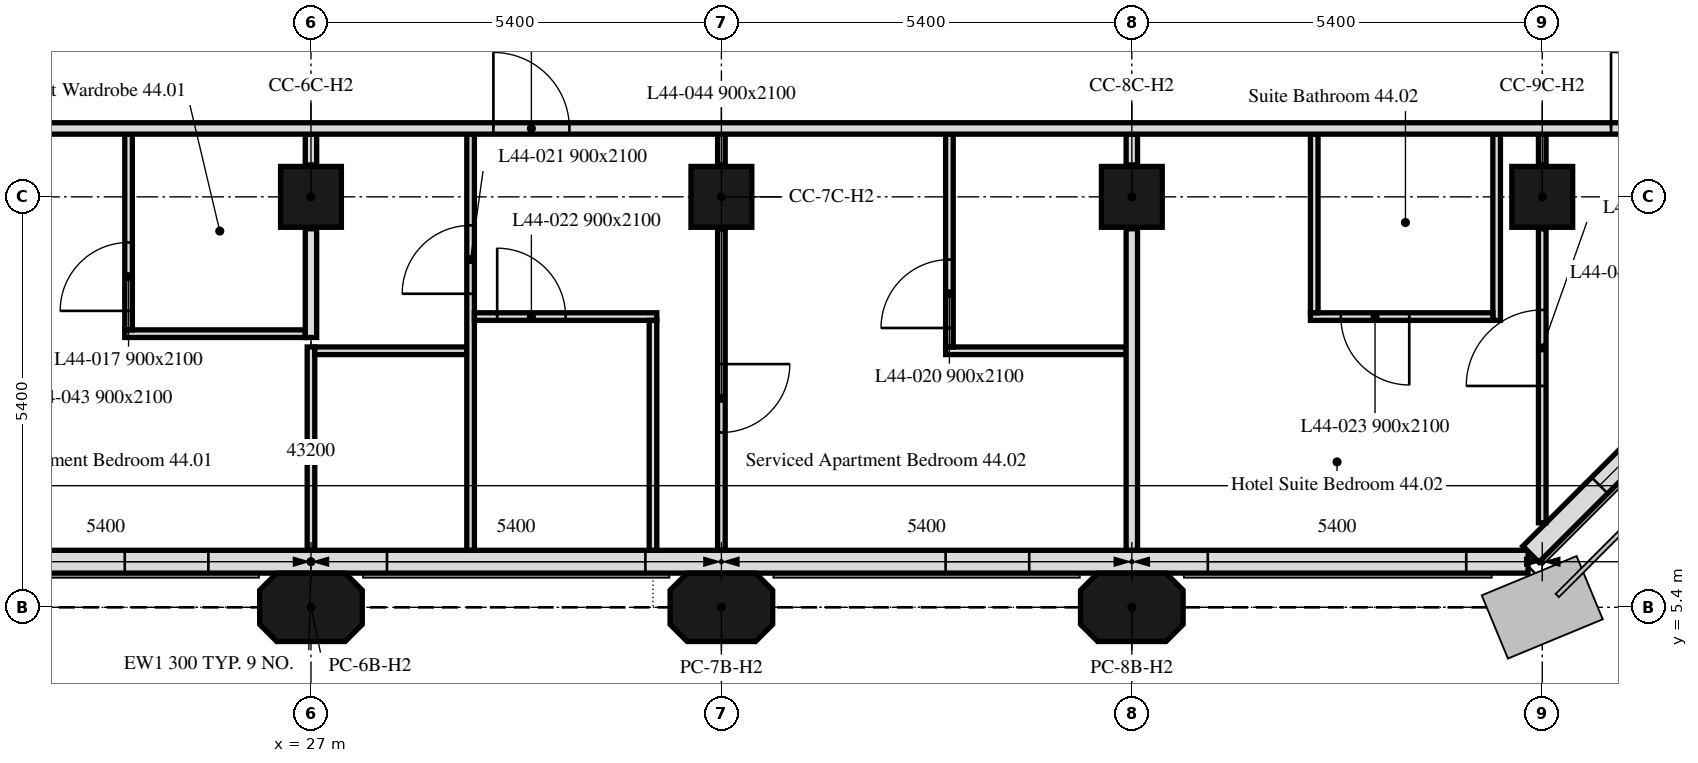
"""IFC4 building model, lengths in metres.
Left out: names, types, materials, properties, quantities, classifications, styles, units other than length and angle.
Written with IfcOpenShell. Run it as: python <this file> out.ifc"""

import sys

from ifc_helpers import new_model, si_unit, direction, frame, frame_2d, origin, origin_2d, place, context, subcontext, project, spatial, polyline, rectangle, outline, extrude, element, fill, save


model = new_model("IFC4")
c1 = context("Model", 3, precision=1e-05, world=origin(), true_north=direction((0.0, 1.0)))
c2 = subcontext(c1, "Body", "Model", "MODEL_VIEW")
j1 = project(units=[si_unit("LENGTHUNIT", "METRE"), si_unit("PLANEANGLEUNIT", "RADIAN")], contexts=[c1])
p1 = place(None, origin())
s1 = spatial("IfcSite", under=j1, at=p1, CompositionType="ELEMENT")
p2 = place(p1, origin())
s2 = spatial("IfcBuilding", under=s1, at=p2, CompositionType="ELEMENT")
p3 = place(p2, frame((0.0, 0.0, 184.0)))
s3 = spatial("IfcBuildingStorey", under=s2, at=p3, CompositionType="ELEMENT", Elevation=184.0)
for number, where, z_axis, x_axis in (
    (1, (27.0, 5.4, 0.0), (0.0, 0.0, 1.0), (1.0, 0.0, 0.0)),
    (2, (32.4, 5.4, 0.0), (0.0, 0.0, 1.0), (1.0, 0.0, 0.0)),
    (3, (37.8, 5.4, 0.0), (0.0, 0.0, 1.0), (1.0, 0.0, 0.0)),
):
    element("IfcColumn", number, at=place(p3, frame(where, z_axis=z_axis, x_axis=x_axis)), inside=s3, PredefinedType="COLUMN", context=c2, shape_type="SweptSolid", body=[
        extrude(outline(polyline([(-0.45, -0.45), (0.45, -0.45), (0.675, -0.225), (0.675, 0.225), (0.45, 0.45), (-0.45, 0.45), (-0.675, 0.225), (-0.675, -0.225), (-0.45, -0.45)])), origin(), (0.0, 0.0, 1.0), 3.0),
    ])
for number, where, z_axis, x_axis in (
    (4, (27.0, 10.8, 0.0), (0.0, 0.0, 1.0), (1.0, 0.0, 0.0)),
    (5, (32.4, 10.8, 0.0), (0.0, 0.0, 1.0), (1.0, 0.0, 0.0)),
    (6, (37.8, 10.8, 0.0), (0.0, 0.0, 1.0), (1.0, 0.0, 0.0)),
    (7, (43.2, 10.8, 0.0), (0.0, 0.0, 1.0), (1.0, 0.0, 0.0)),
):
    element("IfcColumn", number, at=place(p3, frame(where, z_axis=z_axis, x_axis=x_axis)), inside=s3, PredefinedType="COLUMN", context=c2, shape_type="SweptSolid", body=[
        extrude(rectangle(XDim=0.8, YDim=0.8, at=origin_2d()), origin(), (0.0, 0.0, 1.0), 3.0),
    ])
p4 = place(p3, frame((10.986, 6.0, 0.0), z_axis=(0.0, 0.0, 1.0), x_axis=(1.0, 0.0, 0.0)))
e8 = element("IfcWall", 8, at=p4, inside=s3, PredefinedType="SOLIDWALL", context=c2, shape_type="SweptSolid", body=[
    extrude(rectangle(XDim=32.027, YDim=0.3, at=frame_2d((16.014, 0.0))), origin(), (0.0, 0.0, 1.0), 3.0),
])
p5 = place(p4, frame((2.764, 0.0, 0.9)))
e9 = element("IfcOpeningElement", 9, at=p5, cuts=e8, PredefinedType="OPENING", context=c2, shape_type="SweptSolid", body=[
    extrude(rectangle(XDim=1.1, YDim=1.7, at=frame_2d((0.55, 0.85))), frame((0.0, 0.16, 0.0), z_axis=(0.0, -1.0, 0.0), x_axis=(1.0, 0.0, 0.0)), (0.0, 0.0, 1.0), 0.32),
])
p6 = place(p4, frame((6.214, 0.0, 0.9)))
e10 = element("IfcOpeningElement", 10, at=p6, cuts=e8, PredefinedType="OPENING", context=c2, shape_type="SweptSolid", body=[
    extrude(rectangle(XDim=3.4, YDim=1.7, at=frame_2d((1.7, 0.85))), frame((0.0, 0.16, 0.0), z_axis=(0.0, -1.0, 0.0), x_axis=(1.0, 0.0, 0.0)), (0.0, 0.0, 1.0), 0.32),
])
p7 = place(p4, frame((13.564, 0.0, 0.9)))
e11 = element("IfcOpeningElement", 11, at=p7, cuts=e8, PredefinedType="OPENING", context=c2, shape_type="SweptSolid", body=[
    extrude(rectangle(XDim=1.1, YDim=1.7, at=frame_2d((0.55, 0.85))), frame((0.0, 0.16, 0.0), z_axis=(0.0, -1.0, 0.0), x_axis=(1.0, 0.0, 0.0)), (0.0, 0.0, 1.0), 0.32),
])
p8 = place(p4, frame((17.014, 0.0, 0.9)))
e12 = element("IfcOpeningElement", 12, at=p8, cuts=e8, PredefinedType="OPENING", context=c2, shape_type="SweptSolid", body=[
    extrude(rectangle(XDim=3.4, YDim=1.7, at=frame_2d((1.7, 0.85))), frame((0.0, 0.16, 0.0), z_axis=(0.0, -1.0, 0.0), x_axis=(1.0, 0.0, 0.0)), (0.0, 0.0, 1.0), 0.32),
])
p9 = place(p4, frame((24.364, 0.0, 0.9)))
e13 = element("IfcOpeningElement", 13, at=p9, cuts=e8, PredefinedType="OPENING", context=c2, shape_type="SweptSolid", body=[
    extrude(rectangle(XDim=1.1, YDim=1.7, at=frame_2d((0.55, 0.85))), frame((0.0, 0.16, 0.0), z_axis=(0.0, -1.0, 0.0), x_axis=(1.0, 0.0, 0.0)), (0.0, 0.0, 1.0), 0.32),
])
p10 = place(p4, frame((27.814, 0.0, 0.9)))
e14 = element("IfcOpeningElement", 14, at=p10, cuts=e8, PredefinedType="OPENING", context=c2, shape_type="SweptSolid", body=[
    extrude(rectangle(XDim=3.4, YDim=1.7, at=frame_2d((1.7, 0.85))), frame((0.0, 0.16, 0.0), z_axis=(0.0, -1.0, 0.0), x_axis=(1.0, 0.0, 0.0)), (0.0, 0.0, 1.0), 0.32),
])
p11 = place(p3, frame((43.051, 6.099, 0.0), z_axis=(0.0, 0.0, 1.0), x_axis=(0.707106781187, 0.707106781187, 0.0)))
e15 = element("IfcWall", 15, at=p11, inside=s3, PredefinedType="SOLIDWALL", context=c2, shape_type="SweptSolid", body=[
    extrude(rectangle(XDim=6.86, YDim=0.3, at=frame_2d((3.43, 0.0))), origin(), (0.0, 0.0, 1.0), 3.0),
])
p12 = place(p11, frame((1.28, 0.0, 0.9)))
e16 = element("IfcOpeningElement", 16, at=p12, cuts=e15, PredefinedType="OPENING", context=c2, shape_type="SweptSolid", body=[
    extrude(rectangle(XDim=1.1, YDim=1.7, at=frame_2d((0.55, 0.85))), frame((0.0, 0.16, 0.0), z_axis=(0.0, -1.0, 0.0), x_axis=(1.0, 0.0, 0.0)), (0.0, 0.0, 1.0), 0.32),
])
p13 = place(p11, frame((4.48, 0.0, 0.9)))
e17 = element("IfcOpeningElement", 17, at=p13, cuts=e15, PredefinedType="OPENING", context=c2, shape_type="SweptSolid", body=[
    extrude(rectangle(XDim=1.1, YDim=1.7, at=frame_2d((0.55, 0.85))), frame((0.0, 0.16, 0.0), z_axis=(0.0, -1.0, 0.0), x_axis=(1.0, 0.0, 0.0)), (0.0, 0.0, 1.0), 0.32),
])
p14 = place(p3, frame((27.0, 6.151, 0.0), z_axis=(0.0, 0.0, 1.0), x_axis=(0.0, 1.0, 0.0)))
e18 = element("IfcWall", 18, at=p14, inside=s3, PredefinedType="PARTITIONING", context=c2, shape_type="SweptSolid", body=[
    extrude(rectangle(XDim=2.674, YDim=0.1, at=frame_2d((1.337, 0.0))), origin(), (0.0, 0.0, 1.0), 3.0),
])
p15 = place(p3, frame((26.925, 9.0, 0.0), z_axis=(0.0, 0.0, 1.0), x_axis=(-1.0, 0.0, 0.0)))
e19 = element("IfcWall", 19, at=p15, inside=s3, PredefinedType="PARTITIONING", context=c2, shape_type="SweptSolid", body=[
    extrude(rectangle(XDim=2.375, YDim=0.1, at=frame_2d((1.188, 0.0))), origin(), (0.0, 0.0, 1.0), 3.0),
])
p16 = place(p3, frame((24.6, 9.05, 0.0), z_axis=(0.0, 0.0, 1.0), x_axis=(0.0, 1.0, 0.0)))
e20 = element("IfcWall", 20, at=p16, inside=s3, PredefinedType="PARTITIONING", context=c2, shape_type="SweptSolid", body=[
    extrude(rectangle(XDim=2.575, YDim=0.1, at=frame_2d((1.288, 0.0))), origin(), (0.0, 0.0, 1.0), 3.0),
])
p17 = place(p16, frame((0.25, 0.0, 0.0)))
e21 = element("IfcOpeningElement", 21, at=p17, cuts=e20, PredefinedType="OPENING", context=c2, shape_type="SweptSolid", body=[
    extrude(rectangle(XDim=0.9, YDim=2.1, at=frame_2d((0.45, 1.05))), frame((0.0, 0.05, 0.0), z_axis=(0.0, -1.0, 0.0), x_axis=(1.0, 0.0, 0.0)), (0.0, 0.0, 1.0), 0.1),
])
p18 = place(p3, frame((27.0, 8.95, 0.0), z_axis=(0.0, 0.0, 1.0), x_axis=(0.0, 1.0, 0.0)))
e22 = element("IfcWall", 22, at=p18, inside=s3, PredefinedType="PARTITIONING", context=c2, shape_type="SweptSolid", body=[
    extrude(rectangle(XDim=1.43, YDim=0.15, at=frame_2d((0.715, 0.0))), origin(), (0.0, 0.0, 1.0), 3.0),
])
p19 = place(p3, frame((27.0, 11.22, 0.0), z_axis=(0.0, 0.0, 1.0), x_axis=(0.0, 1.0, 0.0)))
e23 = element("IfcWall", 23, at=p19, inside=s3, PredefinedType="PARTITIONING", context=c2, shape_type="SweptSolid", body=[
    extrude(rectangle(XDim=0.405, YDim=0.15, at=frame_2d((0.203, 0.0))), origin(), (0.0, 0.0, 1.0), 3.0),
])
p20 = place(p3, frame((37.725, 8.775, 0.0), z_axis=(0.0, 0.0, 1.0), x_axis=(-1.0, 0.0, 0.0)))
e24 = element("IfcWall", 24, at=p20, inside=s3, PredefinedType="PARTITIONING", context=c2, shape_type="SweptSolid", body=[
    extrude(rectangle(XDim=2.375, YDim=0.1, at=frame_2d((1.188, 0.0))), origin(), (0.0, 0.0, 1.0), 3.0),
])
p21 = place(p3, frame((35.4, 8.825, 0.0), z_axis=(0.0, 0.0, 1.0), x_axis=(0.0, 1.0, 0.0)))
e25 = element("IfcWall", 25, at=p21, inside=s3, PredefinedType="PARTITIONING", context=c2, shape_type="SweptSolid", body=[
    extrude(rectangle(XDim=2.8, YDim=0.1, at=frame_2d((1.4, 0.0))), origin(), (0.0, 0.0, 1.0), 3.0),
])
p22 = place(p21, frame((0.25, 0.0, 0.0)))
e26 = element("IfcOpeningElement", 26, at=p22, cuts=e25, PredefinedType="OPENING", context=c2, shape_type="SweptSolid", body=[
    extrude(rectangle(XDim=0.9, YDim=2.1, at=frame_2d((0.45, 1.05))), frame((0.0, 0.05, 0.0), z_axis=(0.0, -1.0, 0.0), x_axis=(1.0, 0.0, 0.0)), (0.0, 0.0, 1.0), 0.1),
])
p23 = place(p3, frame((32.4, 11.625, 0.0), z_axis=(0.0, 0.0, 1.0), x_axis=(0.0, -1.0, 0.0)))
e27 = element("IfcWall", 27, at=p23, inside=s3, PredefinedType="PARTITIONING", context=c2, shape_type="SweptSolid", body=[
    extrude(rectangle(XDim=0.405, YDim=0.1, at=frame_2d((0.203, 0.0))), origin(), (0.0, 0.0, 1.0), 3.0),
])
p24 = place(p3, frame((32.4, 10.38, 0.0), z_axis=(0.0, 0.0, 1.0), x_axis=(0.0, -1.0, 0.0)))
e28 = element("IfcWall", 28, at=p24, inside=s3, PredefinedType="PARTITIONING", context=c2, shape_type="SweptSolid", body=[
    extrude(rectangle(XDim=4.229, YDim=0.1, at=frame_2d((2.115, 0.0))), origin(), (0.0, 0.0, 1.0), 3.0),
])
p25 = place(p24, frame((1.78, 0.0, 0.0)))
e29 = element("IfcOpeningElement", 29, at=p25, cuts=e28, PredefinedType="OPENING", context=c2, shape_type="SweptSolid", body=[
    extrude(rectangle(XDim=0.9, YDim=2.1, at=frame_2d((0.45, 1.05))), frame((0.0, 0.05, 0.0), z_axis=(0.0, -1.0, 0.0), x_axis=(1.0, 0.0, 0.0)), (0.0, 0.0, 1.0), 0.1),
])
p26 = place(p3, frame((27.05, 8.775, 0.0), z_axis=(0.0, 0.0, 1.0), x_axis=(1.0, 0.0, 0.0)))
e30 = element("IfcWall", 30, at=p26, inside=s3, PredefinedType="PARTITIONING", context=c2, shape_type="SweptSolid", body=[
    extrude(rectangle(XDim=2.0, YDim=0.1, at=frame_2d((1.0, 0.0))), origin(), (0.0, 0.0, 1.0), 3.0),
])
p27 = place(p3, frame((29.1, 6.151, 0.0), z_axis=(0.0, 0.0, 1.0), x_axis=(0.0, 1.0, 0.0)))
e31 = element("IfcWall", 31, at=p27, inside=s3, PredefinedType="PARTITIONING", context=c2, shape_type="SweptSolid", body=[
    extrude(rectangle(XDim=5.474, YDim=0.1, at=frame_2d((2.737, 0.0))), origin(), (0.0, 0.0, 1.0), 3.0),
])
p28 = place(p27, frame((3.374, 0.0, 0.0)))
e32 = element("IfcOpeningElement", 32, at=p28, cuts=e31, PredefinedType="OPENING", context=c2, shape_type="SweptSolid", body=[
    extrude(rectangle(XDim=0.9, YDim=2.1, at=frame_2d((0.45, 1.05))), frame((0.0, 0.05, 0.0), z_axis=(0.0, -1.0, 0.0), x_axis=(1.0, 0.0, 0.0)), (0.0, 0.0, 1.0), 0.1),
])
p29 = place(p3, frame((29.15, 9.225, 0.0), z_axis=(0.0, 0.0, 1.0), x_axis=(1.0, 0.0, 0.0)))
e33 = element("IfcWall", 33, at=p29, inside=s3, PredefinedType="PARTITIONING", context=c2, shape_type="SweptSolid", body=[
    extrude(rectangle(XDim=2.4, YDim=0.1, at=frame_2d((1.2, 0.0))), origin(), (0.0, 0.0, 1.0), 3.0),
])
p30 = place(p29, frame((0.3, 0.0, 0.0)))
e34 = element("IfcOpeningElement", 34, at=p30, cuts=e33, PredefinedType="OPENING", context=c2, shape_type="SweptSolid", body=[
    extrude(rectangle(XDim=0.9, YDim=2.1, at=frame_2d((0.45, 1.05))), frame((0.0, 0.05, 0.0), z_axis=(0.0, -1.0, 0.0), x_axis=(1.0, 0.0, 0.0)), (0.0, 0.0, 1.0), 0.1),
])
p31 = place(p3, frame((31.5, 9.175, 0.0), z_axis=(0.0, 0.0, 1.0), x_axis=(0.0, -1.0, 0.0)))
e35 = element("IfcWall", 35, at=p31, inside=s3, PredefinedType="PARTITIONING", context=c2, shape_type="SweptSolid", body=[
    extrude(rectangle(XDim=3.024, YDim=0.1, at=frame_2d((1.512, 0.0))), origin(), (0.0, 0.0, 1.0), 3.0),
])
p32 = place(p3, frame((37.8, 6.151, 0.0), z_axis=(0.0, 0.0, 1.0), x_axis=(0.0, 1.0, 0.0)))
e36 = element("IfcWall", 36, at=p32, inside=s3, PredefinedType="PARTITIONING", context=c2, shape_type="SweptSolid", body=[
    extrude(rectangle(XDim=4.229, YDim=0.15, at=frame_2d((2.115, 0.0))), origin(), (0.0, 0.0, 1.0), 3.0),
])
p33 = place(p3, frame((37.8, 11.22, 0.0), z_axis=(0.0, 0.0, 1.0), x_axis=(0.0, 1.0, 0.0)))
e37 = element("IfcWall", 37, at=p33, inside=s3, PredefinedType="PARTITIONING", context=c2, shape_type="SweptSolid", body=[
    extrude(rectangle(XDim=0.405, YDim=0.15, at=frame_2d((0.203, 0.0))), origin(), (0.0, 0.0, 1.0), 3.0),
])
p34 = place(p3, frame((43.2, 6.512, 0.0), z_axis=(0.0, 0.0, 1.0), x_axis=(0.0, 1.0, 0.0)))
e38 = element("IfcWall", 38, at=p34, inside=s3, PredefinedType="PARTITIONING", context=c2, shape_type="SweptSolid", body=[
    extrude(rectangle(XDim=3.868, YDim=0.1, at=frame_2d((1.934, 0.0))), origin(), (0.0, 0.0, 1.0), 3.0),
])
p35 = place(p34, frame((1.8, 0.0, 0.0)))
e39 = element("IfcOpeningElement", 39, at=p35, cuts=e38, PredefinedType="OPENING", context=c2, shape_type="SweptSolid", body=[
    extrude(rectangle(XDim=1.0, YDim=2.1, at=frame_2d((0.5, 1.05))), frame((0.0, 0.05, 0.0), z_axis=(0.0, -1.0, 0.0), x_axis=(1.0, 0.0, 0.0)), (0.0, 0.0, 1.0), 0.1),
])
p36 = place(p3, frame((43.2, 11.22, 0.0), z_axis=(0.0, 0.0, 1.0), x_axis=(0.0, 1.0, 0.0)))
e40 = element("IfcWall", 40, at=p36, inside=s3, PredefinedType="PARTITIONING", context=c2, shape_type="SweptSolid", body=[
    extrude(rectangle(XDim=0.405, YDim=0.1, at=frame_2d((0.203, 0.0))), origin(), (0.0, 0.0, 1.0), 3.0),
])
p37 = place(p3, frame((42.6, 11.625, 0.0), z_axis=(0.0, 0.0, 1.0), x_axis=(0.0, -1.0, 0.0)))
e41 = element("IfcWall", 41, at=p37, inside=s3, PredefinedType="PARTITIONING", context=c2, shape_type="SweptSolid", body=[
    extrude(rectangle(XDim=2.45, YDim=0.1, at=frame_2d((1.225, 0.0))), origin(), (0.0, 0.0, 1.0), 3.0),
])
p38 = place(p3, frame((42.55, 9.225, 0.0), z_axis=(0.0, 0.0, 1.0), x_axis=(-1.0, 0.0, 0.0)))
e42 = element("IfcWall", 42, at=p38, inside=s3, PredefinedType="PARTITIONING", context=c2, shape_type="SweptSolid", body=[
    extrude(rectangle(XDim=2.4, YDim=0.1, at=frame_2d((1.2, 0.0))), origin(), (0.0, 0.0, 1.0), 3.0),
])
p39 = place(p38, frame((1.1, 0.0, 0.0)))
e43 = element("IfcOpeningElement", 43, at=p39, cuts=e42, PredefinedType="OPENING", context=c2, shape_type="SweptSolid", body=[
    extrude(rectangle(XDim=0.9, YDim=2.1, at=frame_2d((0.45, 1.05))), frame((0.0, 0.05, 0.0), z_axis=(0.0, -1.0, 0.0), x_axis=(1.0, 0.0, 0.0)), (0.0, 0.0, 1.0), 0.1),
])
p40 = place(p3, frame((40.2, 9.275, 0.0), z_axis=(0.0, 0.0, 1.0), x_axis=(0.0, 1.0, 0.0)))
e44 = element("IfcWall", 44, at=p40, inside=s3, PredefinedType="PARTITIONING", context=c2, shape_type="SweptSolid", body=[
    extrude(rectangle(XDim=2.35, YDim=0.1, at=frame_2d((1.175, 0.0))), origin(), (0.0, 0.0, 1.0), 3.0),
])
p41 = place(p3, frame((6.151, 11.7, 0.0), z_axis=(0.0, 0.0, 1.0), x_axis=(1.0, 0.0, 0.0)))
e45 = element("IfcWall", 45, at=p41, inside=s3, PredefinedType="PARTITIONING", context=c2, shape_type="SweptSolid", body=[
    extrude(rectangle(XDim=41.698, YDim=0.15, at=frame_2d((20.849, 0.0))), origin(), (0.0, 0.0, 1.0), 3.0),
])
p42 = place(p41, frame((1.449, 0.0, 0.0)))
e46 = element("IfcOpeningElement", 46, at=p42, cuts=e45, PredefinedType="OPENING", context=c2, shape_type="SweptSolid", body=[
    extrude(rectangle(XDim=1.0, YDim=2.1, at=frame_2d((0.5, 1.05))), frame((0.0, 0.075, 0.0), z_axis=(0.0, -1.0, 0.0), x_axis=(1.0, 0.0, 0.0)), (0.0, 0.0, 1.0), 0.15),
])
p43 = place(p41, frame((37.954, 0.0, 0.0)))
e47 = element("IfcOpeningElement", 47, at=p43, cuts=e45, PredefinedType="OPENING", context=c2, shape_type="SweptSolid", body=[
    extrude(rectangle(XDim=1.0, YDim=2.1, at=frame_2d((0.5, 1.05))), frame((0.0, 0.075, 0.0), z_axis=(0.0, -1.0, 0.0), x_axis=(1.0, 0.0, 0.0)), (0.0, 0.0, 1.0), 0.15),
])
p44 = place(p41, frame((12.449, 0.0, 0.0)))
e48 = element("IfcOpeningElement", 48, at=p44, cuts=e45, PredefinedType="OPENING", context=c2, shape_type="SweptSolid", body=[
    extrude(rectangle(XDim=1.0, YDim=2.1, at=frame_2d((0.5, 1.05))), frame((0.0, 0.075, 0.0), z_axis=(0.0, -1.0, 0.0), x_axis=(1.0, 0.0, 0.0)), (0.0, 0.0, 1.0), 0.15),
])
p45 = place(p41, frame((23.249, 0.0, 0.0)))
e49 = element("IfcOpeningElement", 49, at=p45, cuts=e45, PredefinedType="OPENING", context=c2, shape_type="SweptSolid", body=[
    extrude(rectangle(XDim=1.0, YDim=2.1, at=frame_2d((0.5, 1.05))), frame((0.0, 0.075, 0.0), z_axis=(0.0, -1.0, 0.0), x_axis=(1.0, 0.0, 0.0)), (0.0, 0.0, 1.0), 0.15),
])
p46 = place(p7, origin())
e50 = element("IfcWindow", 50, at=p46, inside=s3, PartitioningType="SINGLE_PANEL", PredefinedType="WINDOW", context=c2, shape_type="SweptSolid", body=[
    extrude(rectangle(XDim=1.1, YDim=1.7, at=frame_2d((0.55, 0.85))), frame((0.0, 0.03, 0.0), z_axis=(0.0, -1.0, 0.0), x_axis=(1.0, 0.0, 0.0)), (0.0, 0.0, 1.0), 0.06),
])
fill(e11, e50)
p47 = place(p8, origin())
e51 = element("IfcWindow", 51, at=p47, inside=s3, PartitioningType="SINGLE_PANEL", PredefinedType="WINDOW", context=c2, shape_type="SweptSolid", body=[
    extrude(rectangle(XDim=3.4, YDim=1.7, at=frame_2d((1.7, 0.85))), frame((0.0, 0.03, 0.0), z_axis=(0.0, -1.0, 0.0), x_axis=(1.0, 0.0, 0.0)), (0.0, 0.0, 1.0), 0.06),
])
fill(e12, e51)
p48 = place(p9, origin())
e52 = element("IfcWindow", 52, at=p48, inside=s3, PartitioningType="SINGLE_PANEL", PredefinedType="WINDOW", context=c2, shape_type="SweptSolid", body=[
    extrude(rectangle(XDim=1.1, YDim=1.7, at=frame_2d((0.55, 0.85))), frame((0.0, 0.03, 0.0), z_axis=(0.0, -1.0, 0.0), x_axis=(1.0, 0.0, 0.0)), (0.0, 0.0, 1.0), 0.06),
])
fill(e13, e52)
p49 = place(p10, origin())
e53 = element("IfcWindow", 53, at=p49, inside=s3, PartitioningType="SINGLE_PANEL", PredefinedType="WINDOW", context=c2, shape_type="SweptSolid", body=[
    extrude(rectangle(XDim=3.4, YDim=1.7, at=frame_2d((1.7, 0.85))), frame((0.0, 0.03, 0.0), z_axis=(0.0, -1.0, 0.0), x_axis=(1.0, 0.0, 0.0)), (0.0, 0.0, 1.0), 0.06),
])
fill(e14, e53)
p50 = place(p12, origin())
e54 = element("IfcWindow", 54, at=p50, inside=s3, PartitioningType="SINGLE_PANEL", PredefinedType="WINDOW", context=c2, shape_type="SweptSolid", body=[
    extrude(rectangle(XDim=1.1, YDim=1.7, at=frame_2d((0.55, 0.85))), frame((0.0, 0.03, 0.0), z_axis=(0.0, -1.0, 0.0), x_axis=(1.0, 0.0, 0.0)), (0.0, 0.0, 1.0), 0.06),
])
fill(e16, e54)
p51 = place(p17, origin())
e55 = element("IfcDoor", 55, at=p51, inside=s3, OperationType="SINGLE_SWING_RIGHT", PredefinedType="DOOR", context=c2, shape_type="SweptSolid", body=[
    extrude(rectangle(XDim=0.9, YDim=2.1, at=frame_2d((0.45, 1.05))), frame((0.0, 0.025, 0.0), z_axis=(0.0, -1.0, 0.0), x_axis=(1.0, 0.0, 0.0)), (0.0, 0.0, 1.0), 0.05),
])
fill(e21, e55)
p52 = place(p22, origin())
e56 = element("IfcDoor", 56, at=p52, inside=s3, OperationType="SINGLE_SWING_LEFT", PredefinedType="DOOR", context=c2, shape_type="SweptSolid", body=[
    extrude(rectangle(XDim=0.9, YDim=2.1, at=frame_2d((0.45, 1.05))), frame((0.0, 0.025, 0.0), z_axis=(0.0, -1.0, 0.0), x_axis=(1.0, 0.0, 0.0)), (0.0, 0.0, 1.0), 0.05),
])
fill(e26, e56)
p53 = place(p28, origin())
e57 = element("IfcDoor", 57, at=p53, inside=s3, OperationType="SINGLE_SWING_RIGHT", PredefinedType="DOOR", context=c2, shape_type="SweptSolid", body=[
    extrude(rectangle(XDim=0.9, YDim=2.1, at=frame_2d((0.45, 1.05))), frame((0.0, 0.025, 0.0), z_axis=(0.0, -1.0, 0.0), x_axis=(1.0, 0.0, 0.0)), (0.0, 0.0, 1.0), 0.05),
])
fill(e32, e57)
p54 = place(p30, origin())
e58 = element("IfcDoor", 58, at=p54, inside=s3, OperationType="SINGLE_SWING_LEFT", PredefinedType="DOOR", context=c2, shape_type="SweptSolid", body=[
    extrude(rectangle(XDim=0.9, YDim=2.1, at=frame_2d((0.45, 1.05))), frame((0.0, 0.025, 0.0), z_axis=(0.0, -1.0, 0.0), x_axis=(1.0, 0.0, 0.0)), (0.0, 0.0, 1.0), 0.05),
])
fill(e34, e58)
p55 = place(p39, origin())
e59 = element("IfcDoor", 59, at=p55, inside=s3, OperationType="SINGLE_SWING_RIGHT", PredefinedType="DOOR", context=c2, shape_type="SweptSolid", body=[
    extrude(rectangle(XDim=0.9, YDim=2.1, at=frame_2d((0.45, 1.05))), frame((0.0, 0.025, 0.0), z_axis=(0.0, -1.0, 0.0), x_axis=(1.0, 0.0, 0.0)), (0.0, 0.0, 1.0), 0.05),
])
fill(e43, e59)
p56 = place(p25, origin())
e60 = element("IfcDoor", 60, at=p56, inside=s3, OperationType="SINGLE_SWING_RIGHT", PredefinedType="DOOR", context=c2, shape_type="SweptSolid", body=[
    extrude(rectangle(XDim=0.9, YDim=2.1, at=frame_2d((0.45, 1.05))), frame((0.0, 0.025, 0.0), z_axis=(0.0, -1.0, 0.0), x_axis=(1.0, 0.0, 0.0)), (0.0, 0.0, 1.0), 0.05),
])
fill(e29, e60)
p57 = place(p35, origin())
e61 = element("IfcDoor", 61, at=p57, inside=s3, OperationType="SINGLE_SWING_RIGHT", PredefinedType="DOOR", context=c2, shape_type="SweptSolid", body=[
    extrude(rectangle(XDim=1.0, YDim=2.1, at=frame_2d((0.5, 1.05))), frame((0.0, 0.025, 0.0), z_axis=(0.0, -1.0, 0.0), x_axis=(1.0, 0.0, 0.0)), (0.0, 0.0, 1.0), 0.05),
])
fill(e39, e61)
p58 = place(p43, origin())
e62 = element("IfcDoor", 62, at=p58, inside=s3, OperationType="SINGLE_SWING_RIGHT", PredefinedType="DOOR", context=c2, shape_type="SweptSolid", body=[
    extrude(rectangle(XDim=1.0, YDim=2.1, at=frame_2d((0.5, 1.05))), frame((0.0, 0.025, 0.0), z_axis=(0.0, -1.0, 0.0), x_axis=(1.0, 0.0, 0.0)), (0.0, 0.0, 1.0), 0.05),
])
fill(e47, e62)
p59 = place(p45, origin())
e63 = element("IfcDoor", 63, at=p59, inside=s3, OperationType="SINGLE_SWING_LEFT", PredefinedType="DOOR", context=c2, shape_type="SweptSolid", body=[
    extrude(rectangle(XDim=1.0, YDim=2.1, at=frame_2d((0.5, 1.05))), frame((0.0, 0.025, 0.0), z_axis=(0.0, -1.0, 0.0), x_axis=(1.0, 0.0, 0.0)), (0.0, 0.0, 1.0), 0.05),
])
fill(e49, e63)
save(model, sys.argv[1])
